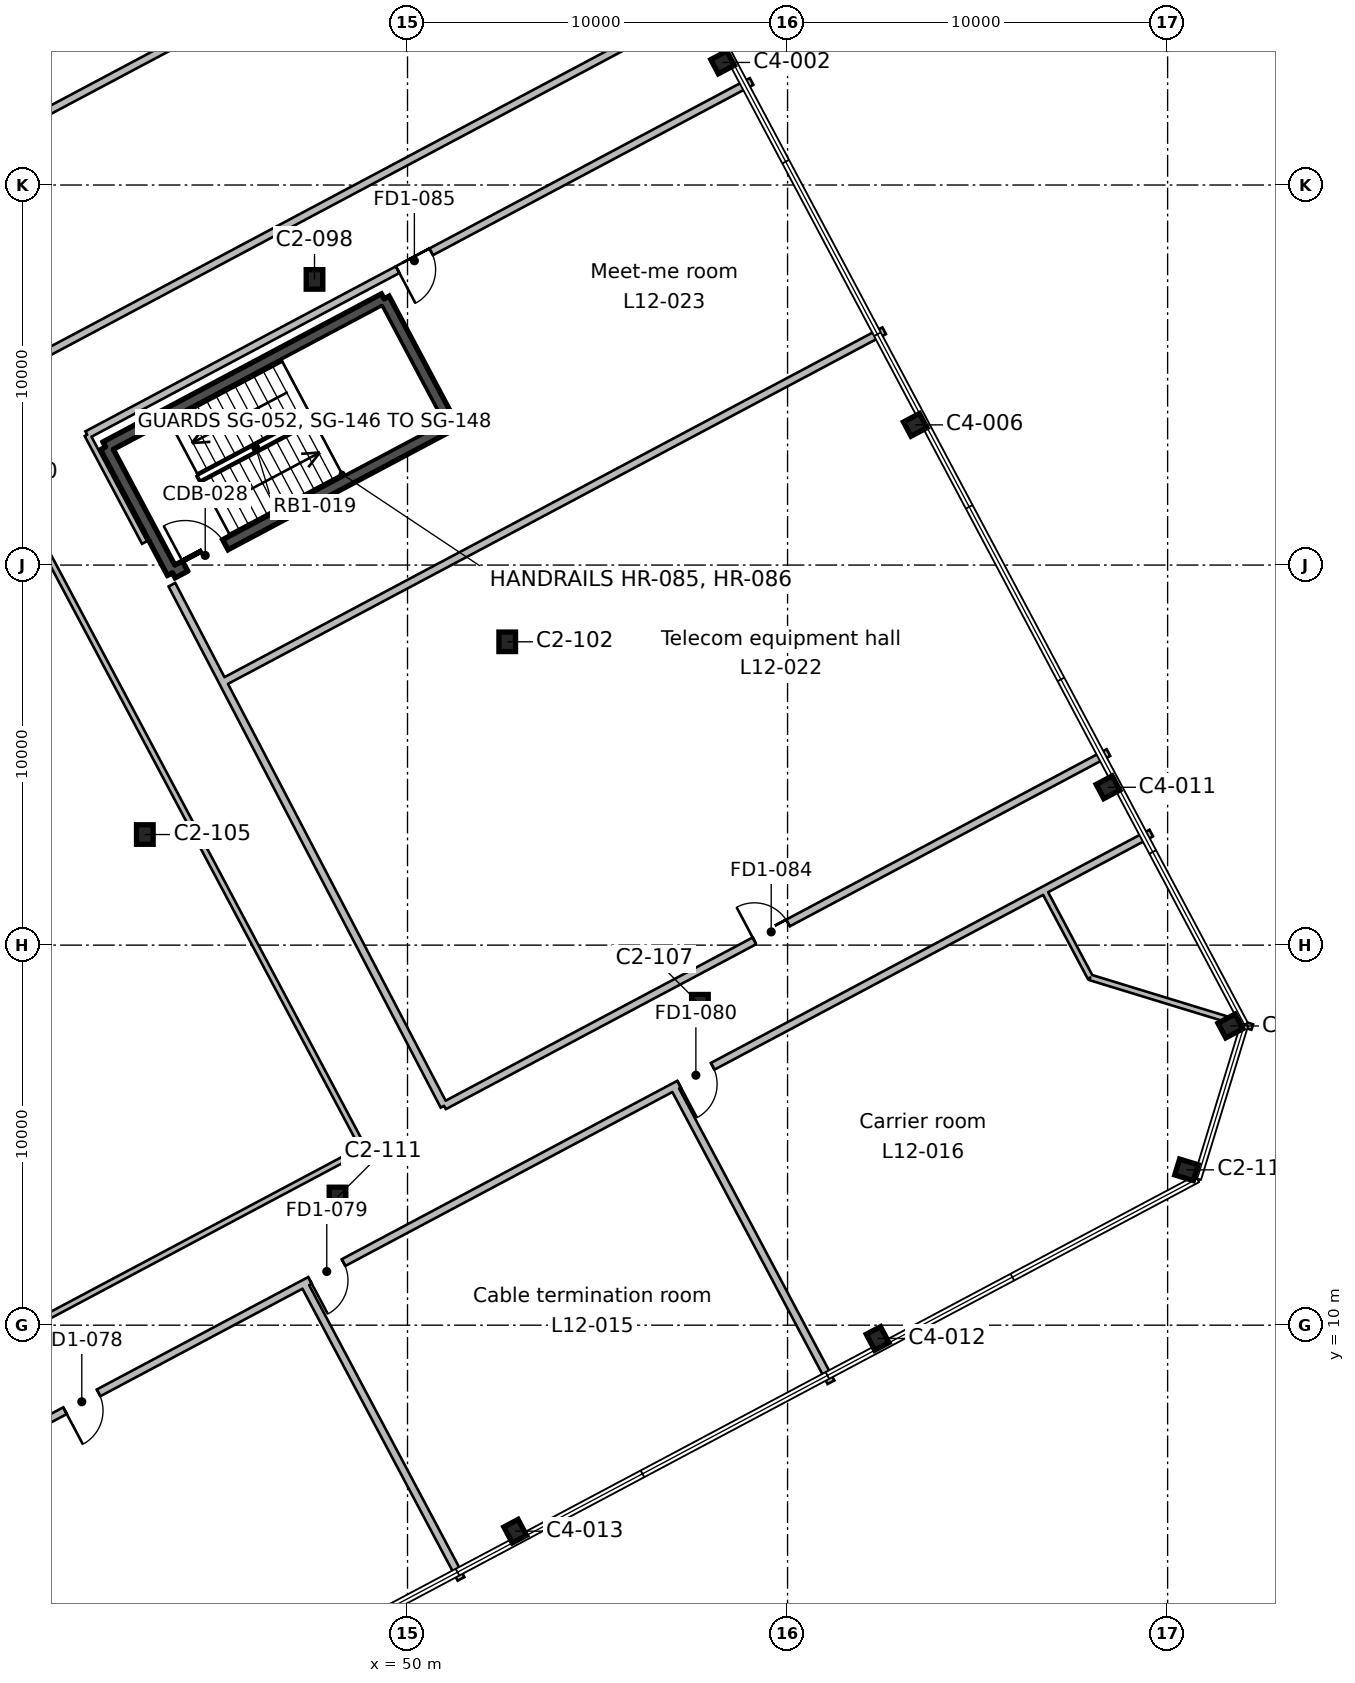
"""IFC4 building model, lengths in metres.
Left out: names, types, materials, properties, quantities, classifications, styles, units other than length and angle.
Written with IfcOpenShell. Run it as: python <this file> out.ifc"""

import sys

from ifc_helpers import new_model, si_unit, direction, frame, frame_2d, origin, origin_2d, place, context, subcontext, project, spatial, rectangle, i_section, extrude, element, fill, save


model = new_model("IFC4")
c1 = context("Model", 3, precision=1e-05, world=origin(), true_north=direction((0.0, 1.0)))
c2 = subcontext(c1, "Body", "Model", "MODEL_VIEW")
j1 = project(units=[si_unit("LENGTHUNIT", "METRE"), si_unit("PLANEANGLEUNIT", "RADIAN")], contexts=[c1])
p1 = place(None, origin())
s1 = spatial("IfcSite", under=j1, at=p1, CompositionType="ELEMENT")
p2 = place(p1, origin())
s2 = spatial("IfcBuilding", under=s1, at=p2, CompositionType="ELEMENT")
p3 = place(p2, frame((0.0, 0.0, 66.2)))
s3 = spatial("IfcBuildingStorey", under=s2, at=p3, CompositionType="ELEMENT", Elevation=66.2)
for number, where, z_axis, x_axis in (
    (1, (52.834, 4.58, 0.0), (0.0, 0.0, 1.0), (0.883, 0.469, 0.0)),
    (2, (62.37, 9.651, 0.0), (0.0, 0.0, 1.0), (0.883, 0.469, 0.0)),
):
    element("IfcColumn", number, at=place(p3, frame(where, z_axis=z_axis, x_axis=x_axis)), inside=s3, PredefinedType="COLUMN", context=c2, shape_type="SweptSolid", body=[
        extrude(i_section(OverallWidth=0.424, OverallDepth=0.475, WebThickness=0.048, FlangeThickness=0.077, FilletRadius=0.015, at=origin_2d()), origin(), (0.0, 0.0, 1.0), 4.6),
    ])
for number, where, z_axis, x_axis in (
    (3, (48.158, 13.374, 0.0), (0.0, 0.0, 1.0), (1.0, 0.0, 0.0)),
    (4, (70.497, 14.087, 0.0), (0.0, 0.0, 1.0), (0.292, 0.956, 0.0)),
    (5, (71.654, 17.873, 0.0), (0.0, 0.0, 1.0), (-0.469, 0.883, 0.0)),
    (6, (57.694, 18.445, 0.0), (0.0, 0.0, 1.0), (1.0, 0.0, 0.0)),
    (7, (43.088, 22.91, 0.0), (0.0, 0.0, 1.0), (1.0, 0.0, 0.0)),
):
    element("IfcColumn", number, at=place(p3, frame(where, z_axis=z_axis, x_axis=x_axis)), inside=s3, PredefinedType="COLUMN", context=c2, shape_type="SweptSolid", body=[
        extrude(i_section(OverallWidth=0.437, OverallDepth=0.513, WebThickness=0.061, FlangeThickness=0.097, FilletRadius=0.015, at=origin_2d()), origin(), (0.0, 0.0, 1.0), 4.6),
    ])
p4 = place(p3, frame((68.431, 24.153, 0.0), z_axis=(0.0, 0.0, 1.0), x_axis=(-0.469471562786, 0.882947592859, 0.0)))
e8 = element("IfcColumn", 8, at=p4, inside=s3, PredefinedType="COLUMN", context=c2, shape_type="SweptSolid", body=[
    extrude(i_section(OverallWidth=0.424, OverallDepth=0.475, WebThickness=0.048, FlangeThickness=0.077, FilletRadius=0.015, at=origin_2d()), origin(), (0.0, 0.0, 1.0), 4.6),
])
p5 = place(p3, frame((52.624, 27.981, 0.0), z_axis=(0.0, 0.0, 1.0), x_axis=(1.0, 0.0, 0.0)))
e9 = element("IfcColumn", 9, at=p5, inside=s3, PredefinedType="COLUMN", context=c2, shape_type="SweptSolid", body=[
    extrude(i_section(OverallWidth=0.437, OverallDepth=0.513, WebThickness=0.061, FlangeThickness=0.097, FilletRadius=0.015, at=origin_2d()), origin(), (0.0, 0.0, 1.0), 4.6),
])
p6 = place(p3, frame((63.36, 33.689, 0.0), z_axis=(0.0, 0.0, 1.0), x_axis=(-0.469471562786, 0.882947592859, 0.0)))
e10 = element("IfcColumn", 10, at=p6, inside=s3, PredefinedType="COLUMN", context=c2, shape_type="SweptSolid", body=[
    extrude(i_section(OverallWidth=0.424, OverallDepth=0.475, WebThickness=0.048, FlangeThickness=0.077, FilletRadius=0.015, at=origin_2d()), origin(), (0.0, 0.0, 1.0), 4.6),
])
p7 = place(p3, frame((47.553, 37.516, 0.0), z_axis=(0.0, 0.0, 1.0), x_axis=(1.0, 0.0, 0.0)))
e11 = element("IfcColumn", 11, at=p7, inside=s3, PredefinedType="COLUMN", context=c2, shape_type="SweptSolid", body=[
    extrude(i_section(OverallWidth=0.437, OverallDepth=0.513, WebThickness=0.061, FlangeThickness=0.097, FilletRadius=0.015, at=origin_2d()), origin(), (0.0, 0.0, 1.0), 4.6),
])
p8 = place(p3, frame((58.29, 43.225, 0.0), z_axis=(0.0, 0.0, 1.0), x_axis=(-0.469471562786, 0.882947592859, 0.0)))
e12 = element("IfcColumn", 12, at=p8, inside=s3, PredefinedType="COLUMN", context=c2, shape_type="SweptSolid", body=[
    extrude(i_section(OverallWidth=0.424, OverallDepth=0.475, WebThickness=0.048, FlangeThickness=0.077, FilletRadius=0.015, at=origin_2d()), origin(), (0.0, 0.0, 1.0), 4.6),
])
p9 = place(p3, frame((49.384, 37.004, 0.0), z_axis=(0.0, 0.0, 1.0), x_axis=(0.46946936446, -0.882948761726, 0.0)))
e13 = element("IfcWall", 13, at=p9, inside=s3, PredefinedType="SHEAR", context=c2, shape_type="SweptSolid", body=[
    extrude(rectangle(XDim=3.75, YDim=0.3, at=frame_2d((1.875, 0.0))), origin(), (0.0, 0.0, 1.0), 4.6),
])
p10 = place(p3, frame((51.145, 33.693, 0.0), z_axis=(0.0, 0.0, 1.0), x_axis=(-0.882945809314, -0.469474917132, 0.0)))
e14 = element("IfcWall", 14, at=p10, inside=s3, PredefinedType="SHEAR", context=c2, shape_type="SweptSolid", body=[
    extrude(rectangle(XDim=8.3, YDim=0.3, at=frame_2d((4.15, 0.0))), origin(), (0.0, 0.0, 1.0), 4.6),
])
p11 = place(p10, frame((6.725, 0.0, 0.0)))
e15 = element("IfcOpeningElement", 15, at=p11, cuts=e14, PredefinedType="OPENING", context=c2, shape_type="SweptSolid", body=[
    extrude(rectangle(XDim=1.2, YDim=2.1, at=frame_2d((0.6, 1.05))), frame((0.0, 0.16, 0.0), z_axis=(0.0, -1.0, 0.0), x_axis=(1.0, 0.0, 0.0)), (0.0, 0.0, 1.0), 0.32),
])
p12 = place(p3, frame((43.816, 29.796, 0.0), z_axis=(0.0, 0.0, 1.0), x_axis=(-0.46946936446, 0.882948761726, 0.0)))
e16 = element("IfcWall", 16, at=p12, inside=s3, PredefinedType="SHEAR", context=c2, shape_type="SweptSolid", body=[
    extrude(rectangle(XDim=3.75, YDim=0.3, at=frame_2d((1.875, 0.0))), origin(), (0.0, 0.0, 1.0), 4.6),
])
p13 = place(p3, frame((42.055, 33.107, 0.0), z_axis=(0.0, 0.0, 1.0), x_axis=(0.882945809314, 0.469474917132, 0.0)))
e17 = element("IfcWall", 17, at=p13, inside=s3, PredefinedType="SHEAR", context=c2, shape_type="SweptSolid", body=[
    extrude(rectangle(XDim=8.3, YDim=0.3, at=frame_2d((4.15, 0.0))), origin(), (0.0, 0.0, 1.0), 4.6),
])
p14 = place(p3, frame((0.0, 14.044, 0.0), z_axis=(0.0, 0.0, 1.0), x_axis=(0.882943219941, 0.469479786955, 0.0)))
e18 = element("IfcWall", 18, at=p14, inside=s3, PredefinedType="PARTITIONING", context=c2, shape_type="SweptSolid", body=[
    extrude(rectangle(XDim=65.607, YDim=0.2, at=frame_2d((32.803, 0.0))), origin(), (0.0, 0.0, 1.0), 4.2),
])
p15 = place(p14, frame((35.55, 0.0, 0.0)))
e19 = element("IfcOpeningElement", 19, at=p15, cuts=e18, PredefinedType="OPENING", context=c2, shape_type="SweptSolid", body=[
    extrude(rectangle(XDim=1.0, YDim=2.1, at=frame_2d((0.5, 1.05))), frame((0.0, 0.11, 0.0), z_axis=(0.0, -1.0, 0.0), x_axis=(1.0, 0.0, 0.0)), (0.0, 0.0, 1.0), 0.22),
])
p16 = place(p14, frame((32.15, 0.0, 0.0)))
e20 = element("IfcOpeningElement", 20, at=p16, cuts=e18, PredefinedType="OPENING", context=c2, shape_type="SweptSolid", body=[
    extrude(rectangle(XDim=1.0, YDim=2.1, at=frame_2d((0.5, 1.05))), frame((0.0, 0.11, 0.0), z_axis=(0.0, -1.0, 0.0), x_axis=(1.0, 0.0, 0.0)), (0.0, 0.0, 1.0), 0.22),
])
p17 = place(p14, frame((13.95, 0.0, 0.0)))
e21 = element("IfcOpeningElement", 21, at=p17, cuts=e18, PredefinedType="OPENING", context=c2, shape_type="SweptSolid", body=[
    extrude(rectangle(XDim=1.0, YDim=2.1, at=frame_2d((0.5, 1.05))), frame((0.0, 0.11, 0.0), z_axis=(0.0, -1.0, 0.0), x_axis=(1.0, 0.0, 0.0)), (0.0, 0.0, 1.0), 0.22),
])
p18 = place(p3, frame((69.57, 22.948, 0.0), z_axis=(0.0, 0.0, 1.0), x_axis=(-0.882939582192, -0.469486628349, 0.0)))
e22 = element("IfcWall", 22, at=p18, inside=s3, PredefinedType="PARTITIONING", context=c2, shape_type="SweptSolid", body=[
    extrude(rectangle(XDim=63.39, YDim=0.2, at=frame_2d((31.695, 0.0))), origin(), (0.0, 0.0, 1.0), 4.2),
])
p19 = place(p18, frame((41.971, 0.0, 0.0)))
e23 = element("IfcOpeningElement", 23, at=p19, cuts=e22, PredefinedType="OPENING", context=c2, shape_type="SweptSolid", body=[
    extrude(rectangle(XDim=1.0, YDim=2.1, at=frame_2d((0.5, 1.05))), frame((0.0, 0.11, 0.0), z_axis=(0.0, -1.0, 0.0), x_axis=(1.0, 0.0, 0.0)), (0.0, 0.0, 1.0), 0.22),
])
p20 = place(p18, frame((31.371, 0.0, 0.0)))
e24 = element("IfcOpeningElement", 24, at=p20, cuts=e22, PredefinedType="OPENING", context=c2, shape_type="SweptSolid", body=[
    extrude(rectangle(XDim=1.0, YDim=2.1, at=frame_2d((0.5, 1.05))), frame((0.0, 0.11, 0.0), z_axis=(0.0, -1.0, 0.0), x_axis=(1.0, 0.0, 0.0)), (0.0, 0.0, 1.0), 0.22),
])
p21 = place(p18, frame((24.071, 0.0, 0.0)))
e25 = element("IfcOpeningElement", 25, at=p21, cuts=e22, PredefinedType="OPENING", context=c2, shape_type="SweptSolid", body=[
    extrude(rectangle(XDim=1.0, YDim=2.1, at=frame_2d((0.5, 1.05))), frame((0.0, 0.11, 0.0), z_axis=(0.0, -1.0, 0.0), x_axis=(1.0, 0.0, 0.0)), (0.0, 0.0, 1.0), 0.22),
])
p22 = place(p18, frame((13.071, 0.0, 0.0)))
e26 = element("IfcOpeningElement", 26, at=p22, cuts=e22, PredefinedType="OPENING", context=c2, shape_type="SweptSolid", body=[
    extrude(rectangle(XDim=1.0, YDim=2.1, at=frame_2d((0.5, 1.05))), frame((0.0, 0.11, 0.0), z_axis=(0.0, -1.0, 0.0), x_axis=(1.0, 0.0, 0.0)), (0.0, 0.0, 1.0), 0.22),
])
p23 = place(p3, frame((29.26, 35.945, 0.0), z_axis=(0.0, 0.0, 1.0), x_axis=(0.882968820758, 0.469431636737, 0.0)))
e27 = element("IfcWall", 27, at=p23, inside=s3, PredefinedType="PARTITIONING", context=c2, shape_type="SweptSolid", body=[
    extrude(rectangle(XDim=23.29, YDim=0.2, at=frame_2d((11.645, 0.0))), origin(), (0.0, 0.0, 1.0), 4.2),
])
p24 = place(p3, frame((47.278, 11.094, 0.0), z_axis=(0.0, 0.0, 1.0), x_axis=(0.469337789067, -0.883018708609, 0.0)))
e28 = element("IfcWall", 28, at=p24, inside=s3, PredefinedType="PARTITIONING", context=c2, shape_type="SweptSolid", body=[
    extrude(rectangle(XDim=8.799, YDim=0.2, at=frame_2d((4.4, 0.0))), origin(), (0.0, 0.0, 1.0), 4.2),
])
p25 = place(p3, frame((41.572, 33.43, 0.0), z_axis=(0.0, 0.0, 1.0), x_axis=(0.882950585831, 0.469465933781, 0.0)))
e29 = element("IfcWall", 29, at=p25, inside=s3, PredefinedType="PARTITIONING", context=c2, shape_type="SweptSolid", body=[
    extrude(rectangle(XDim=19.8, YDim=0.2, at=frame_2d((9.9, 0.0))), origin(), (0.0, 0.0, 1.0), 4.2),
])
p26 = place(p25, frame((9.25, 0.0, 0.0)))
e30 = element("IfcOpeningElement", 30, at=p26, cuts=e29, PredefinedType="OPENING", context=c2, shape_type="SweptSolid", body=[
    extrude(rectangle(XDim=1.0, YDim=2.1, at=frame_2d((0.5, 1.05))), frame((0.0, 0.11, 0.0), z_axis=(0.0, -1.0, 0.0), x_axis=(1.0, 0.0, 0.0)), (0.0, 0.0, 1.0), 0.22),
])
p27 = place(p3, frame((41.572, 33.43, 0.0), z_axis=(0.0, 0.0, 1.0), x_axis=(0.469510863882, -0.882926694974, 0.0)))
e31 = element("IfcWall", 31, at=p27, inside=s3, PredefinedType="PARTITIONING", context=c2, shape_type="SweptSolid", body=[
    extrude(rectangle(XDim=3.212, YDim=0.15, at=frame_2d((1.606, 0.0))), origin(), (0.0, 0.0, 1.0), 4.2),
])
p28 = place(p3, frame((43.801, 29.483, 0.0), z_axis=(0.0, 0.0, 1.0), x_axis=(0.462864260364, -0.886429171721, 0.0)))
e32 = element("IfcWall", 32, at=p28, inside=s3, PredefinedType="PARTITIONING", context=c2, shape_type="SweptSolid", body=[
    extrude(rectangle(XDim=15.469, YDim=0.2, at=frame_2d((7.734, 0.0))), origin(), (0.0, 0.0, 1.0), 4.2),
])
p29 = place(p3, frame((50.961, 15.771, 0.0), z_axis=(0.0, 0.0, 1.0), x_axis=(0.882969283776, 0.469430765831, 0.0)))
e33 = element("IfcWall", 33, at=p29, inside=s3, PredefinedType="PARTITIONING", context=c2, shape_type="SweptSolid", body=[
    extrude(rectangle(XDim=19.8, YDim=0.2, at=frame_2d((9.9, 0.0))), origin(), (0.0, 0.0, 1.0), 4.2),
])
p30 = place(p29, frame((9.25, 0.0, 0.0)))
e34 = element("IfcOpeningElement", 34, at=p30, cuts=e33, PredefinedType="OPENING", context=c2, shape_type="SweptSolid", body=[
    extrude(rectangle(XDim=1.0, YDim=2.1, at=frame_2d((0.5, 1.05))), frame((0.0, 0.11, 0.0), z_axis=(0.0, -1.0, 0.0), x_axis=(1.0, 0.0, 0.0)), (0.0, 0.0, 1.0), 0.22),
])
p31 = place(p3, frame((62.542, 36.166, 0.0), z_axis=(0.0, 0.0, 1.0), x_axis=(-0.882962645452, -0.46944325188, 0.0)))
e35 = element("IfcWall", 35, at=p31, inside=s3, PredefinedType="PARTITIONING", context=c2, shape_type="SweptSolid", body=[
    extrude(rectangle(XDim=19.706, YDim=0.2, at=frame_2d((9.853, 0.0))), origin(), (0.0, 0.0, 1.0), 4.2),
])
p32 = place(p3, frame((57.011, 16.269, 0.0), z_axis=(0.0, 0.0, 1.0), x_axis=(0.469445946219, -0.882961212952, 0.0)))
e36 = element("IfcWall", 36, at=p32, inside=s3, PredefinedType="PARTITIONING", context=c2, shape_type="SweptSolid", body=[
    extrude(rectangle(XDim=8.8, YDim=0.2, at=frame_2d((4.4, 0.0))), origin(), (0.0, 0.0, 1.0), 4.2),
])
p33 = place(p3, frame((66.744, 21.445, 0.0), z_axis=(0.0, 0.0, 1.0), x_axis=(0.469720428517, -0.882815223608, 0.0)))
e37 = element("IfcWall", 37, at=p33, inside=s3, PredefinedType="PARTITIONING", context=c2, shape_type="SweptSolid", body=[
    extrude(rectangle(XDim=2.6, YDim=0.15, at=frame_2d((1.3, 0.0))), origin(), (0.0, 0.0, 1.0), 4.2),
])
p34 = place(p3, frame((67.965, 19.15, 0.0), z_axis=(0.0, 0.0, 1.0), x_axis=(0.956221844793, -0.292642757539, 0.0)))
e38 = element("IfcWall", 38, at=p34, inside=s3, PredefinedType="PARTITIONING", context=c2, shape_type="SweptSolid", body=[
    extrude(rectangle(XDim=4.459, YDim=0.15, at=frame_2d((2.229, 0.0))), origin(), (0.0, 0.0, 1.0), 4.2),
])
p35 = place(p3, frame((39.453, 32.303, 0.0), z_axis=(0.0, 0.0, 1.0), x_axis=(0.469461333319, -0.882953031887, 0.0)))
e39 = element("IfcWall", 39, at=p35, inside=s3, PredefinedType="PARTITIONING", context=c2, shape_type="SweptSolid", body=[
    extrude(rectangle(XDim=20.0, YDim=0.15, at=frame_2d((10.0, 0.0))), origin(), (0.0, 0.0, 1.0), 4.2),
])
p36 = place(p3, frame((48.842, 14.644, 0.0), z_axis=(0.0, 0.0, 1.0), x_axis=(-0.882924718888, -0.46951457994, 0.0)))
e40 = element("IfcWall", 40, at=p36, inside=s3, PredefinedType="PARTITIONING", context=c2, shape_type="SweptSolid", body=[
    extrude(rectangle(XDim=10.0, YDim=0.15, at=frame_2d((5.0, 0.0))), origin(), (0.0, 0.0, 1.0), 4.2),
])
p37 = place(p11, frame((1.2, 0.0, 0.0), z_axis=(0.0, 0.0, 1.0), x_axis=(-1.0, 0.0, 0.0)))
e41 = element("IfcDoor", 41, at=p37, inside=s3, OperationType="SINGLE_SWING_LEFT", PredefinedType="DOOR", context=c2, shape_type="SweptSolid", body=[
    extrude(rectangle(XDim=1.2, YDim=2.1, at=frame_2d((0.6, 1.05))), frame((0.0, 0.025, 0.0), z_axis=(0.0, -1.0, 0.0), x_axis=(1.0, 0.0, 0.0)), (0.0, 0.0, 1.0), 0.05),
])
fill(e15, e41)
p38 = place(p20, origin())
e42 = element("IfcDoor", 42, at=p38, inside=s3, OperationType="SINGLE_SWING_RIGHT", PredefinedType="DOOR", context=c2, shape_type="SweptSolid", body=[
    extrude(rectangle(XDim=1.0, YDim=2.1, at=frame_2d((0.5, 1.05))), frame((0.0, 0.025, 0.0), z_axis=(0.0, -1.0, 0.0), x_axis=(1.0, 0.0, 0.0)), (0.0, 0.0, 1.0), 0.05),
])
fill(e24, e42)
p39 = place(p21, origin())
e43 = element("IfcDoor", 43, at=p39, inside=s3, OperationType="SINGLE_SWING_RIGHT", PredefinedType="DOOR", context=c2, shape_type="SweptSolid", body=[
    extrude(rectangle(XDim=1.0, YDim=2.1, at=frame_2d((0.5, 1.05))), frame((0.0, 0.025, 0.0), z_axis=(0.0, -1.0, 0.0), x_axis=(1.0, 0.0, 0.0)), (0.0, 0.0, 1.0), 0.05),
])
fill(e25, e43)
p40 = place(p22, origin())
e44 = element("IfcDoor", 44, at=p40, inside=s3, OperationType="SINGLE_SWING_RIGHT", PredefinedType="DOOR", context=c2, shape_type="SweptSolid", body=[
    extrude(rectangle(XDim=1.0, YDim=2.1, at=frame_2d((0.5, 1.05))), frame((0.0, 0.025, 0.0), z_axis=(0.0, -1.0, 0.0), x_axis=(1.0, 0.0, 0.0)), (0.0, 0.0, 1.0), 0.05),
])
fill(e26, e44)
p41 = place(p30, origin())
e45 = element("IfcDoor", 45, at=p41, inside=s3, OperationType="SINGLE_SWING_LEFT", PredefinedType="DOOR", context=c2, shape_type="SweptSolid", body=[
    extrude(rectangle(XDim=1.0, YDim=2.1, at=frame_2d((0.5, 1.05))), frame((0.0, 0.025, 0.0), z_axis=(0.0, -1.0, 0.0), x_axis=(1.0, 0.0, 0.0)), (0.0, 0.0, 1.0), 0.05),
])
fill(e34, e45)
p42 = place(p26, frame((1.0, 0.0, 0.0), z_axis=(0.0, 0.0, 1.0), x_axis=(-1.0, 0.0, 0.0)))
e46 = element("IfcDoor", 46, at=p42, inside=s3, OperationType="SINGLE_SWING_RIGHT", PredefinedType="DOOR", context=c2, shape_type="SweptSolid", body=[
    extrude(rectangle(XDim=1.0, YDim=2.1, at=frame_2d((0.5, 1.05))), frame((0.0, 0.025, 0.0), z_axis=(0.0, -1.0, 0.0), x_axis=(1.0, 0.0, 0.0)), (0.0, 0.0, 1.0), 0.05),
])
fill(e30, e46)
save(model, sys.argv[1])
